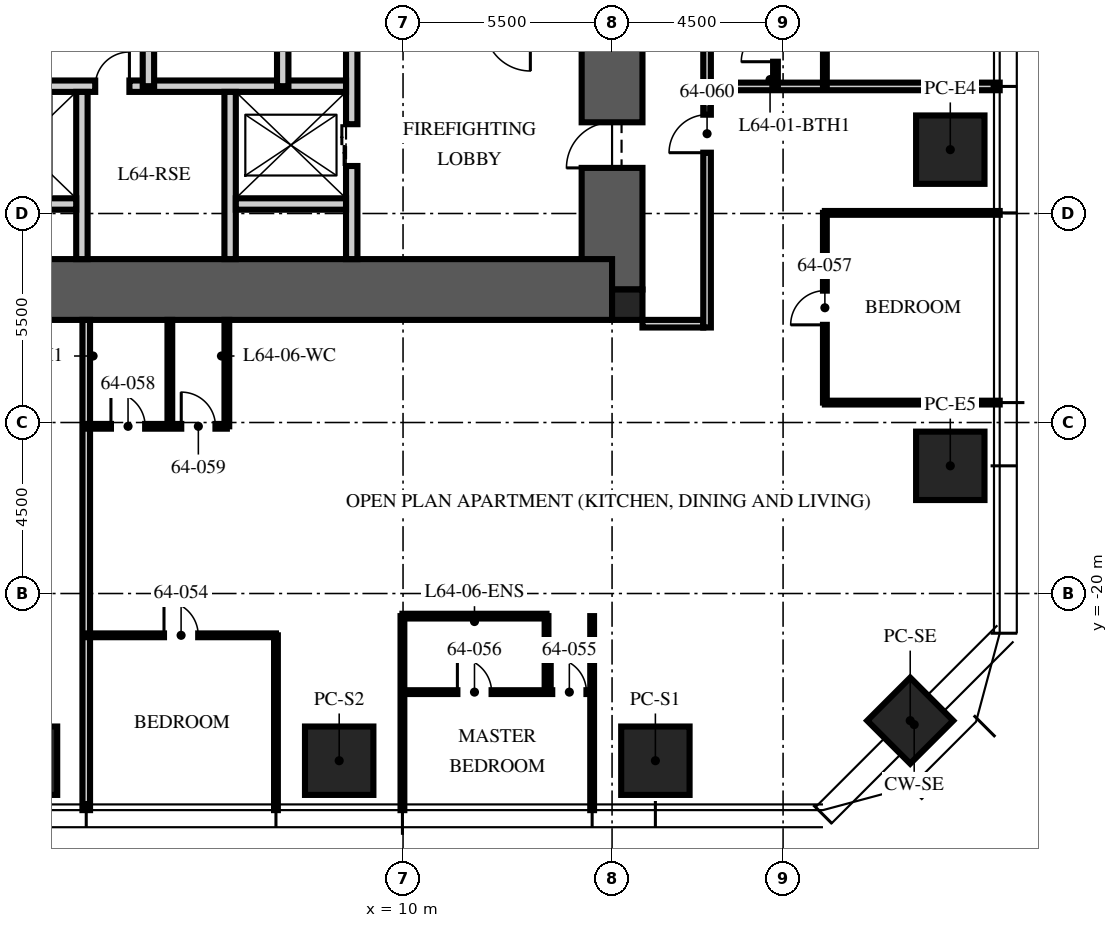
"""IFC4 building model, lengths in metres.
Left out: names, types, materials, properties, quantities, classifications, styles, units other than length and angle.
Written with IfcOpenShell. Run it as: python <this file> out.ifc"""

import sys

from ifc_helpers import new_model, si_unit, direction, frame, frame_2d, origin, origin_2d, place, context, subcontext, project, spatial, rectangle, extrude, element, fill, save


model = new_model("IFC4")
c1 = context("Model", 3, precision=1e-05, world=origin(), true_north=direction((0.0, 1.0)))
c2 = subcontext(c1, "Body", "Model", "MODEL_VIEW")
j1 = project(units=[si_unit("LENGTHUNIT", "METRE"), si_unit("PLANEANGLEUNIT", "RADIAN")], contexts=[c1])
p1 = place(None, origin())
s1 = spatial("IfcSite", under=j1, at=p1, CompositionType="ELEMENT")
p2 = place(p1, origin())
s2 = spatial("IfcBuilding", under=s1, at=p2, CompositionType="ELEMENT")
p3 = place(p2, frame((0.0, 0.0, 255.75)))
s3 = spatial("IfcBuildingStorey", under=s2, at=p3, CompositionType="ELEMENT", Elevation=255.75)
p4 = place(p3, frame((15.5, -12.0, -0.25), z_axis=(0.0, 0.0, 1.0), x_axis=(0.0, 1.0, 0.0)))
e1 = element("IfcWall", 1, at=p4, inside=s3, PredefinedType="SHEAR", context=c2, shape_type="SweptSolid", body=[
    extrude(rectangle(XDim=24.0, YDim=1.6, at=frame_2d((12.0, 0.0))), origin(), (0.0, 0.0, 1.0), 3.75),
])
p5 = place(p4, frame((3.2, 0.0, 0.25)))
e2 = element("IfcOpeningElement", 2, at=p5, cuts=e1, PredefinedType="OPENING", context=c2, shape_type="SweptSolid", body=[
    extrude(rectangle(XDim=1.2, YDim=2.1, at=frame_2d((0.6, 1.05))), frame((0.0, 0.81, 0.0), z_axis=(0.0, -1.0, 0.0), x_axis=(1.0, 0.0, 0.0)), (0.0, 0.0, 1.0), 1.62),
])
p6 = place(p4, frame((19.3, 0.0, 0.25)))
e3 = element("IfcOpeningElement", 3, at=p6, cuts=e1, PredefinedType="OPENING", context=c2, shape_type="SweptSolid", body=[
    extrude(rectangle(XDim=1.8, YDim=2.1, at=frame_2d((0.9, 1.05))), frame((0.0, 0.81, 0.0), z_axis=(0.0, -1.0, 0.0), x_axis=(1.0, 0.0, 0.0)), (0.0, 0.0, 1.0), 1.62),
])
p7 = place(p3, frame((-15.5, -12.0, -0.25), z_axis=(0.0, 0.0, 1.0), x_axis=(1.0, 0.0, 0.0)))
e4 = element("IfcWall", 4, at=p7, inside=s3, PredefinedType="SHEAR", context=c2, shape_type="SweptSolid", body=[
    extrude(rectangle(XDim=31.0, YDim=1.6, at=frame_2d((15.5, 0.0))), origin(), (0.0, 0.0, 1.0), 3.75),
])
p8 = place(p3, frame((15.9, -12.4, -0.25), z_axis=(0.0, 0.0, 1.0), x_axis=(1.0, 0.0, 0.0)))
e5 = element("IfcColumn", 5, at=p8, inside=s3, PredefinedType="COLUMN", context=c2, shape_type="SweptSolid", body=[
    extrude(rectangle(XDim=0.8, YDim=0.8, at=origin_2d()), origin(), (0.0, 0.0, 1.0), 3.75),
])
for number, where, z_axis, x_axis in (
    (6, (24.4, -8.32, 0.0), (0.0, 0.0, 1.0), (0.0, 1.0, 0.0)),
    (7, (24.4, -16.64, 0.0), (0.0, 0.0, 1.0), (0.0, 1.0, 0.0)),
    (8, (16.64, -24.4, 0.0), (0.0, 0.0, 1.0), (1.0, 0.0, 0.0)),
    (9, (8.32, -24.4, 0.0), (0.0, 0.0, 1.0), (1.0, 0.0, 0.0)),
    (10, (0.0, -24.4, 0.0), (0.0, 0.0, 1.0), (1.0, 0.0, 0.0)),
):
    element("IfcColumn", number, at=place(p3, frame(where, z_axis=z_axis, x_axis=x_axis)), inside=s3, PredefinedType="COLUMN", context=c2, shape_type="SweptSolid", body=[
        extrude(rectangle(XDim=1.8, YDim=1.8, at=origin_2d()), origin(), (0.0, 0.0, 1.0), 3.75),
    ])
p9 = place(p3, frame((23.346, -23.346, 0.0), z_axis=(0.0, 0.0, 1.0), x_axis=(0.707106781187, 0.707106781187, 0.0)))
e11 = element("IfcColumn", 11, at=p9, inside=s3, PredefinedType="COLUMN", context=c2, shape_type="SweptSolid", body=[
    extrude(rectangle(XDim=1.6, YDim=1.6, at=origin_2d()), origin(), (0.0, 0.0, 1.0), 3.75),
])
p10 = place(p3, frame((8.65, -11.2, 0.0), z_axis=(0.0, 0.0, 1.0), x_axis=(0.0, 1.0, 0.0)))
e12 = element("IfcWall", 12, at=p10, inside=s3, PredefinedType="PARTITIONING", context=c2, shape_type="SweptSolid", body=[
    extrude(rectangle(XDim=6.3, YDim=0.3, at=frame_2d((3.15, 0.0))), origin(), (0.0, 0.0, 1.0), 3.5),
])
p11 = place(p10, frame((2.45, 0.0, 0.0)))
e13 = element("IfcOpeningElement", 13, at=p11, cuts=e12, PredefinedType="OPENING", context=c2, shape_type="SweptSolid", body=[
    extrude(rectangle(XDim=1.1, YDim=2.1, at=frame_2d((0.55, 1.05))), frame((0.0, 0.16, 0.0), z_axis=(0.0, -1.0, 0.0), x_axis=(1.0, 0.0, 0.0)), (0.0, 0.0, 1.0), 0.32),
])
p12 = place(p3, frame((-8.5, -6.65, 0.0), z_axis=(0.0, 0.0, 1.0), x_axis=(1.0, 0.0, 0.0)))
e14 = element("IfcWall", 14, at=p12, inside=s3, PredefinedType="PARTITIONING", context=c2, shape_type="SweptSolid", body=[
    extrude(rectangle(XDim=17.0, YDim=0.3, at=frame_2d((8.5, 0.0))), origin(), (0.0, 0.0, 1.0), 3.5),
])
p13 = place(p12, frame((7.8, 0.0, 0.0)))
e15 = element("IfcOpeningElement", 15, at=p13, cuts=e14, PredefinedType="OPENING", context=c2, shape_type="SweptSolid", body=[
    extrude(rectangle(XDim=1.3, YDim=2.4, at=frame_2d((0.65, 1.2))), frame((0.0, 0.16, 0.0), z_axis=(0.0, -1.0, 0.0), x_axis=(1.0, 0.0, 0.0)), (0.0, 0.0, 1.0), 0.32),
])
p14 = place(p12, frame((5.65, 0.0, 0.0)))
e16 = element("IfcOpeningElement", 16, at=p14, cuts=e14, PredefinedType="OPENING", context=c2, shape_type="SweptSolid", body=[
    extrude(rectangle(XDim=0.9, YDim=2.1, at=frame_2d((0.45, 1.05))), frame((0.0, 0.16, 0.0), z_axis=(0.0, -1.0, 0.0), x_axis=(1.0, 0.0, 0.0)), (0.0, 0.0, 1.0), 0.32),
])
p15 = place(p12, frame((10.4, 0.0, 0.0)))
e17 = element("IfcOpeningElement", 17, at=p15, cuts=e14, PredefinedType="OPENING", context=c2, shape_type="SweptSolid", body=[
    extrude(rectangle(XDim=0.9, YDim=2.1, at=frame_2d((0.45, 1.05))), frame((0.0, 0.16, 0.0), z_axis=(0.0, -1.0, 0.0), x_axis=(1.0, 0.0, 0.0)), (0.0, 0.0, 1.0), 0.32),
])
for number, where, z_axis, x_axis in (
    (18, (1.55, -11.2, 0.0), (0.0, 0.0, 1.0), (0.0, 1.0, 0.0)),
    (19, (5.45, -11.2, 0.0), (0.0, 0.0, 1.0), (0.0, 1.0, 0.0)),
):
    element("IfcWall", number, at=place(p3, frame(where, z_axis=z_axis, x_axis=x_axis)), inside=s3, PredefinedType="PARTITIONING", context=c2, shape_type="SweptSolid", body=[
        extrude(rectangle(XDim=4.4, YDim=0.3, at=frame_2d((2.2, 0.0))), origin(), (0.0, 0.0, 1.0), 3.5),
    ])
for number, where, z_axis, x_axis in (
    (20, (-1.5, -9.75, 0.0), (0.0, 0.0, 1.0), (1.0, 0.0, 0.0)),
    (21, (5.6, -9.75, 0.0), (0.0, 0.0, 1.0), (1.0, 0.0, 0.0)),
):
    element("IfcWall", number, at=place(p3, frame(where, z_axis=z_axis, x_axis=x_axis)), inside=s3, PredefinedType="PARTITIONING", context=c2, shape_type="SweptSolid", body=[
        extrude(rectangle(XDim=2.9, YDim=0.3, at=frame_2d((1.45, 0.0))), origin(), (0.0, 0.0, 1.0), 3.5),
    ])
p16 = place(p3, frame((3.3, -6.65, 0.0), z_axis=(0.0, 0.0, 1.0), x_axis=(0.0, 1.0, 0.0)))
e22 = element("IfcWall", 22, at=p16, inside=s3, PredefinedType="PARTITIONING", context=c2, shape_type="SweptSolid", body=[
    extrude(rectangle(XDim=8.65, YDim=0.3, at=frame_2d((4.325, 0.0))), origin(), (0.0, 0.0, 1.0), 3.5),
])
p17 = place(p16, frame((3.875, 0.0, 0.0)))
e23 = element("IfcOpeningElement", 23, at=p17, cuts=e22, PredefinedType="OPENING", context=c2, shape_type="SweptSolid", body=[
    extrude(rectangle(XDim=0.9, YDim=2.1, at=frame_2d((0.45, 1.05))), frame((0.0, 0.16, 0.0), z_axis=(0.0, -1.0, 0.0), x_axis=(1.0, 0.0, 0.0)), (0.0, 0.0, 1.0), 0.32),
])
p18 = place(p3, frame((6.834, -6.65, 0.0), z_axis=(0.0, 0.0, 1.0), x_axis=(0.0, 1.0, 0.0)))
e24 = element("IfcWall", 24, at=p18, inside=s3, PredefinedType="PARTITIONING", context=c2, shape_type="SweptSolid", body=[
    extrude(rectangle(XDim=8.65, YDim=0.3, at=frame_2d((4.325, 0.0))), origin(), (0.0, 0.0, 1.0), 3.5),
])
p19 = place(p3, frame((16.3, -12.9, 0.0), z_axis=(0.0, 0.0, 1.0), x_axis=(1.0, 0.0, 0.0)))
e25 = element("IfcWall", 25, at=p19, inside=s3, PredefinedType="PARTITIONING", context=c2, shape_type="SweptSolid", body=[
    extrude(rectangle(XDim=1.6, YDim=0.2, at=frame_2d((0.8, 0.0))), origin(), (0.0, 0.0, 1.0), 2.3),
])
p20 = place(p3, frame((18.1, -6.656, 0.0), z_axis=(0.0, 0.0, 1.0), x_axis=(1.0, 0.0, 0.0)))
e26 = element("IfcWall", 26, at=p20, inside=s3, PredefinedType="PARTITIONING", context=c2, shape_type="SweptSolid", body=[
    extrude(rectangle(XDim=7.6, YDim=0.2, at=frame_2d((3.8, 0.0))), origin(), (0.0, 0.0, 1.0), 2.91),
])
p21 = place(p3, frame((1.664, -12.8, 0.0), z_axis=(0.0, 0.0, 1.0), x_axis=(0.0, -1.0, 0.0)))
e27 = element("IfcWall", 27, at=p21, inside=s3, PredefinedType="PARTITIONING", context=c2, shape_type="SweptSolid", body=[
    extrude(rectangle(XDim=12.9, YDim=0.2, at=frame_2d((6.45, 0.0))), origin(), (0.0, 0.0, 1.0), 2.91),
])
p22 = place(p3, frame((6.656, -21.1, 0.0), z_axis=(0.0, 0.0, 1.0), x_axis=(0.0, -1.0, 0.0)))
e28 = element("IfcWall", 28, at=p22, inside=s3, PredefinedType="PARTITIONING", context=c2, shape_type="SweptSolid", body=[
    extrude(rectangle(XDim=4.6, YDim=0.1, at=frame_2d((2.3, 0.0))), origin(), (0.0, 0.0, 1.0), 2.91),
])
for number, where, z_axis, x_axis in (
    (29, (9.984, -20.595, 0.0), (0.0, 0.0, 1.0), (0.0, -1.0, 0.0)),
    (30, (14.976, -20.595, 0.0), (0.0, 0.0, 1.0), (0.0, -1.0, 0.0)),
):
    element("IfcWall", number, at=place(p3, frame(where, z_axis=z_axis, x_axis=x_axis)), inside=s3, PredefinedType="PARTITIONING", context=c2, shape_type="SweptSolid", body=[
        extrude(rectangle(XDim=5.105, YDim=0.1, at=frame_2d((2.552, 0.0))), origin(), (0.0, 0.0, 1.0), 2.91),
    ])
for number, where, z_axis, x_axis in (
    (31, (21.1, -14.976, 0.0), (0.0, 0.0, 1.0), (1.0, 0.0, 0.0)),
    (32, (21.1, -9.984, 0.0), (0.0, 0.0, 1.0), (1.0, 0.0, 0.0)),
):
    element("IfcWall", number, at=place(p3, frame(where, z_axis=z_axis, x_axis=x_axis)), inside=s3, PredefinedType="PARTITIONING", context=c2, shape_type="SweptSolid", body=[
        extrude(rectangle(XDim=4.6, YDim=0.1, at=frame_2d((2.3, 0.0))), origin(), (0.0, 0.0, 1.0), 2.91),
    ])
p23 = place(p3, frame((21.1, -6.656, 0.0), z_axis=(0.0, 0.0, 1.0), x_axis=(0.0, 1.0, 0.0)))
e33 = element("IfcWall", 33, at=p23, inside=s3, PredefinedType="PARTITIONING", context=c2, shape_type="SweptSolid", body=[
    extrude(rectangle(XDim=4.992, YDim=0.1, at=frame_2d((2.496, 0.0))), origin(), (0.0, 0.0, 1.0), 2.81),
])
p24 = place(p23, frame((2.046, 0.0, 0.0)))
e34 = element("IfcOpeningElement", 34, at=p24, cuts=e33, PredefinedType="OPENING", context=c2, shape_type="SweptSolid", body=[
    extrude(rectangle(XDim=0.9, YDim=2.1, at=frame_2d((0.45, 1.05))), frame((0.0, 0.06, 0.0), z_axis=(0.0, -1.0, 0.0), x_axis=(1.0, 0.0, 0.0)), (0.0, 0.0, 1.0), 0.12),
])
p25 = place(p3, frame((19.8, -6.656, 0.0), z_axis=(0.0, 0.0, 1.0), x_axis=(0.0, 1.0, 0.0)))
e35 = element("IfcWall", 35, at=p25, inside=s3, PredefinedType="PARTITIONING", context=c2, shape_type="SweptSolid", body=[
    extrude(rectangle(XDim=2.2, YDim=0.125, at=frame_2d((1.1, 0.0))), origin(), (0.0, 0.0, 1.0), 3.5),
])
p26 = place(p25, frame((0.65, 0.0, 0.0)))
e36 = element("IfcOpeningElement", 36, at=p26, cuts=e35, PredefinedType="OPENING", context=c2, shape_type="SweptSolid", body=[
    extrude(rectangle(XDim=0.9, YDim=2.1, at=frame_2d((0.45, 1.05))), frame((0.0, 0.073, 0.0), z_axis=(0.0, -1.0, 0.0), x_axis=(1.0, 0.0, 0.0)), (0.0, 0.0, 1.0), 0.145),
])
p27 = place(p3, frame((1.664, -21.1, 0.0), z_axis=(0.0, 0.0, 1.0), x_axis=(1.0, 0.0, 0.0)))
e37 = element("IfcWall", 37, at=p27, inside=s3, PredefinedType="PARTITIONING", context=c2, shape_type="SweptSolid", body=[
    extrude(rectangle(XDim=4.992, YDim=0.1, at=frame_2d((2.496, 0.0))), origin(), (0.0, 0.0, 1.0), 2.81),
])
p28 = place(p27, frame((2.046, 0.0, 0.0)))
e38 = element("IfcOpeningElement", 38, at=p28, cuts=e37, PredefinedType="OPENING", context=c2, shape_type="SweptSolid", body=[
    extrude(rectangle(XDim=0.9, YDim=2.1, at=frame_2d((0.45, 1.05))), frame((0.0, 0.06, 0.0), z_axis=(0.0, -1.0, 0.0), x_axis=(1.0, 0.0, 0.0)), (0.0, 0.0, 1.0), 0.12),
])
p29 = place(p3, frame((9.984, -22.595, 0.0), z_axis=(0.0, 0.0, 1.0), x_axis=(1.0, 0.0, 0.0)))
e39 = element("IfcWall", 39, at=p29, inside=s3, PredefinedType="PARTITIONING", context=c2, shape_type="SweptSolid", body=[
    extrude(rectangle(XDim=4.992, YDim=0.1, at=frame_2d((2.496, 0.0))), origin(), (0.0, 0.0, 1.0), 2.81),
])
p30 = place(p29, frame((3.942, 0.0, 0.0)))
e40 = element("IfcOpeningElement", 40, at=p30, cuts=e39, PredefinedType="OPENING", context=c2, shape_type="SweptSolid", body=[
    extrude(rectangle(XDim=0.9, YDim=2.1, at=frame_2d((0.45, 1.05))), frame((0.0, 0.06, 0.0), z_axis=(0.0, -1.0, 0.0), x_axis=(1.0, 0.0, 0.0)), (0.0, 0.0, 1.0), 0.12),
])
p31 = place(p29, frame((1.446, 0.0, 0.0)))
e41 = element("IfcOpeningElement", 41, at=p31, cuts=e39, PredefinedType="OPENING", context=c2, shape_type="SweptSolid", body=[
    extrude(rectangle(XDim=0.9, YDim=2.1, at=frame_2d((0.45, 1.05))), frame((0.0, 0.06, 0.0), z_axis=(0.0, -1.0, 0.0), x_axis=(1.0, 0.0, 0.0)), (0.0, 0.0, 1.0), 0.12),
])
p32 = place(p3, frame((13.776, -20.595, 0.0), z_axis=(0.0, 0.0, 1.0), x_axis=(0.0, -1.0, 0.0)))
e42 = element("IfcWall", 42, at=p32, inside=s3, PredefinedType="PARTITIONING", context=c2, shape_type="SweptSolid", body=[
    extrude(rectangle(XDim=2.0, YDim=0.1, at=frame_2d((1.0, 0.0))), origin(), (0.0, 0.0, 1.0), 3.5),
])
p33 = place(p3, frame((9.984, -20.595, 0.0), z_axis=(0.0, 0.0, 1.0), x_axis=(1.0, 0.0, 0.0)))
e43 = element("IfcWall", 43, at=p33, inside=s3, PredefinedType="PARTITIONING", context=c2, shape_type="SweptSolid", body=[
    extrude(rectangle(XDim=3.792, YDim=0.125, at=frame_2d((1.896, 0.0))), origin(), (0.0, 0.0, 1.0), 2.81),
])
p34 = place(p3, frame((21.1, -14.976, 0.0), z_axis=(0.0, 0.0, 1.0), x_axis=(0.0, 1.0, 0.0)))
e44 = element("IfcWall", 44, at=p34, inside=s3, PredefinedType="PARTITIONING", context=c2, shape_type="SweptSolid", body=[
    extrude(rectangle(XDim=4.992, YDim=0.1, at=frame_2d((2.496, 0.0))), origin(), (0.0, 0.0, 1.0), 2.81),
])
p35 = place(p34, frame((2.046, 0.0, 0.0)))
e45 = element("IfcOpeningElement", 45, at=p35, cuts=e44, PredefinedType="OPENING", context=c2, shape_type="SweptSolid", body=[
    extrude(rectangle(XDim=0.9, YDim=2.1, at=frame_2d((0.45, 1.05))), frame((0.0, 0.06, 0.0), z_axis=(0.0, -1.0, 0.0), x_axis=(1.0, 0.0, 0.0)), (0.0, 0.0, 1.0), 0.12),
])
p36 = place(p3, frame((1.664, -15.6, 0.0), z_axis=(0.0, 0.0, 1.0), x_axis=(1.0, 0.0, 0.0)))
e46 = element("IfcWall", 46, at=p36, inside=s3, PredefinedType="PARTITIONING", context=c2, shape_type="SweptSolid", body=[
    extrude(rectangle(XDim=3.7, YDim=0.125, at=frame_2d((1.85, 0.0))), origin(), (0.0, 0.0, 1.0), 2.81),
])
p37 = place(p36, frame((0.65, 0.0, 0.0)))
e47 = element("IfcOpeningElement", 47, at=p37, cuts=e46, PredefinedType="OPENING", context=c2, shape_type="SweptSolid", body=[
    extrude(rectangle(XDim=0.9, YDim=2.1, at=frame_2d((0.45, 1.05))), frame((0.0, 0.073, 0.0), z_axis=(0.0, -1.0, 0.0), x_axis=(1.0, 0.0, 0.0)), (0.0, 0.0, 1.0), 0.145),
])
p38 = place(p36, frame((2.5, 0.0, 0.0)))
e48 = element("IfcOpeningElement", 48, at=p38, cuts=e46, PredefinedType="OPENING", context=c2, shape_type="SweptSolid", body=[
    extrude(rectangle(XDim=0.9, YDim=2.1, at=frame_2d((0.45, 1.05))), frame((0.0, 0.073, 0.0), z_axis=(0.0, -1.0, 0.0), x_axis=(1.0, 0.0, 0.0)), (0.0, 0.0, 1.0), 0.145),
])
for number, where, z_axis, x_axis in (
    (49, (3.864, -12.8, 0.0), (0.0, 0.0, 1.0), (0.0, -1.0, 0.0)),
    (50, (5.364, -12.8, 0.0), (0.0, 0.0, 1.0), (0.0, -1.0, 0.0)),
):
    element("IfcWall", number, at=place(p3, frame(where, z_axis=z_axis, x_axis=x_axis)), inside=s3, PredefinedType="PARTITIONING", context=c2, shape_type="SweptSolid", body=[
        extrude(rectangle(XDim=2.8, YDim=0.125, at=frame_2d((1.4, 0.0))), origin(), (0.0, 0.0, 1.0), 3.5),
    ])
p39 = place(p3, frame((18.0, -13.0, 0.0), z_axis=(0.0, 0.0, 1.0), x_axis=(0.0, 1.0, 0.0)))
e51 = element("IfcWall", 51, at=p39, inside=s3, PredefinedType="PARTITIONING", context=c2, shape_type="SweptSolid", body=[
    extrude(rectangle(XDim=25.8, YDim=0.2, at=frame_2d((12.9, 0.0))), origin(), (0.0, 0.0, 1.0), 2.6),
])
p40 = place(p39, frame((21.364, 0.0, 0.0)))
e52 = element("IfcOpeningElement", 52, at=p40, cuts=e51, PredefinedType="OPENING", context=c2, shape_type="SweptSolid", body=[
    extrude(rectangle(XDim=1.0, YDim=2.2, at=frame_2d((0.5, 1.1))), frame((0.0, 0.11, 0.0), z_axis=(0.0, -1.0, 0.0), x_axis=(1.0, 0.0, 0.0)), (0.0, 0.0, 1.0), 0.22),
])
p41 = place(p39, frame((23.754, 0.0, 0.0)))
e53 = element("IfcOpeningElement", 53, at=p41, cuts=e51, PredefinedType="OPENING", context=c2, shape_type="SweptSolid", body=[
    extrude(rectangle(XDim=1.0, YDim=2.2, at=frame_2d((0.5, 1.1))), frame((0.0, 0.11, 0.0), z_axis=(0.0, -1.0, 0.0), x_axis=(1.0, 0.0, 0.0)), (0.0, 0.0, 1.0), 0.22),
])
p42 = place(p39, frame((4.6, 0.0, 0.0)))
e54 = element("IfcOpeningElement", 54, at=p42, cuts=e51, PredefinedType="OPENING", context=c2, shape_type="SweptSolid", body=[
    extrude(rectangle(XDim=1.0, YDim=2.2, at=frame_2d((0.5, 1.1))), frame((0.0, 0.11, 0.0), z_axis=(0.0, -1.0, 0.0), x_axis=(1.0, 0.0, 0.0)), (0.0, 0.0, 1.0), 0.22),
])
p43 = place(p5, origin())
e55 = element("IfcDoor", 55, at=p43, inside=s3, OperationType="SINGLE_SWING_LEFT", PredefinedType="DOOR", context=c2, shape_type="SweptSolid", body=[
    extrude(rectangle(XDim=1.2, YDim=2.1, at=frame_2d((0.6, 1.05))), frame((0.0, 0.025, 0.0), z_axis=(0.0, -1.0, 0.0), x_axis=(1.0, 0.0, 0.0)), (0.0, 0.0, 1.0), 0.05),
])
fill(e2, e55)
p44 = place(p11, origin())
e56 = element("IfcDoor", 56, at=p44, inside=s3, OperationType="DOUBLE_DOOR_SLIDING", PredefinedType="DOOR", context=c2, shape_type="SweptSolid", body=[
    extrude(rectangle(XDim=1.1, YDim=2.1, at=frame_2d((0.55, 1.05))), frame((0.0, 0.025, 0.0), z_axis=(0.0, -1.0, 0.0), x_axis=(1.0, 0.0, 0.0)), (0.0, 0.0, 1.0), 0.05),
])
fill(e13, e56)
p45 = place(p15, origin())
e57 = element("IfcDoor", 57, at=p45, inside=s3, OperationType="SINGLE_SWING_RIGHT", PredefinedType="DOOR", context=c2, shape_type="SweptSolid", body=[
    extrude(rectangle(XDim=0.9, YDim=2.1, at=frame_2d((0.45, 1.05))), frame((0.0, 0.025, 0.0), z_axis=(0.0, -1.0, 0.0), x_axis=(1.0, 0.0, 0.0)), (0.0, 0.0, 1.0), 0.05),
])
fill(e17, e57)
p46 = place(p26, origin())
e58 = element("IfcDoor", 58, at=p46, inside=s3, OperationType="SINGLE_SWING_LEFT", PredefinedType="DOOR", context=c2, shape_type="SweptSolid", body=[
    extrude(rectangle(XDim=0.9, YDim=2.1, at=frame_2d((0.45, 1.05))), frame((0.0, 0.025, 0.0), z_axis=(0.0, -1.0, 0.0), x_axis=(1.0, 0.0, 0.0)), (0.0, 0.0, 1.0), 0.05),
])
fill(e36, e58)
p47 = place(p28, origin())
e59 = element("IfcDoor", 59, at=p47, inside=s3, OperationType="SINGLE_SWING_LEFT", PredefinedType="DOOR", context=c2, shape_type="SweptSolid", body=[
    extrude(rectangle(XDim=0.9, YDim=2.1, at=frame_2d((0.45, 1.05))), frame((0.0, 0.025, 0.0), z_axis=(0.0, -1.0, 0.0), x_axis=(1.0, 0.0, 0.0)), (0.0, 0.0, 1.0), 0.05),
])
fill(e38, e59)
p48 = place(p30, origin())
e60 = element("IfcDoor", 60, at=p48, inside=s3, OperationType="SINGLE_SWING_LEFT", PredefinedType="DOOR", context=c2, shape_type="SweptSolid", body=[
    extrude(rectangle(XDim=0.9, YDim=2.1, at=frame_2d((0.45, 1.05))), frame((0.0, 0.025, 0.0), z_axis=(0.0, -1.0, 0.0), x_axis=(1.0, 0.0, 0.0)), (0.0, 0.0, 1.0), 0.05),
])
fill(e40, e60)
p49 = place(p31, origin())
e61 = element("IfcDoor", 61, at=p49, inside=s3, OperationType="SINGLE_SWING_LEFT", PredefinedType="DOOR", context=c2, shape_type="SweptSolid", body=[
    extrude(rectangle(XDim=0.9, YDim=2.1, at=frame_2d((0.45, 1.05))), frame((0.0, 0.025, 0.0), z_axis=(0.0, -1.0, 0.0), x_axis=(1.0, 0.0, 0.0)), (0.0, 0.0, 1.0), 0.05),
])
fill(e41, e61)
p50 = place(p35, origin())
e62 = element("IfcDoor", 62, at=p50, inside=s3, OperationType="SINGLE_SWING_LEFT", PredefinedType="DOOR", context=c2, shape_type="SweptSolid", body=[
    extrude(rectangle(XDim=0.9, YDim=2.1, at=frame_2d((0.45, 1.05))), frame((0.0, 0.025, 0.0), z_axis=(0.0, -1.0, 0.0), x_axis=(1.0, 0.0, 0.0)), (0.0, 0.0, 1.0), 0.05),
])
fill(e45, e62)
p51 = place(p37, origin())
e63 = element("IfcDoor", 63, at=p51, inside=s3, OperationType="SINGLE_SWING_LEFT", PredefinedType="DOOR", context=c2, shape_type="SweptSolid", body=[
    extrude(rectangle(XDim=0.9, YDim=2.1, at=frame_2d((0.45, 1.05))), frame((0.0, 0.025, 0.0), z_axis=(0.0, -1.0, 0.0), x_axis=(1.0, 0.0, 0.0)), (0.0, 0.0, 1.0), 0.05),
])
fill(e47, e63)
p52 = place(p38, origin())
e64 = element("IfcDoor", 64, at=p52, inside=s3, OperationType="SINGLE_SWING_LEFT", PredefinedType="DOOR", context=c2, shape_type="SweptSolid", body=[
    extrude(rectangle(XDim=0.9, YDim=2.1, at=frame_2d((0.45, 1.05))), frame((0.0, 0.025, 0.0), z_axis=(0.0, -1.0, 0.0), x_axis=(1.0, 0.0, 0.0)), (0.0, 0.0, 1.0), 0.05),
])
fill(e48, e64)
p53 = place(p42, origin())
e65 = element("IfcDoor", 65, at=p53, inside=s3, OperationType="SINGLE_SWING_LEFT", PredefinedType="DOOR", context=c2, shape_type="SweptSolid", body=[
    extrude(rectangle(XDim=1.0, YDim=2.2, at=frame_2d((0.5, 1.1))), frame((0.0, 0.025, 0.0), z_axis=(0.0, -1.0, 0.0), x_axis=(1.0, 0.0, 0.0)), (0.0, 0.0, 1.0), 0.05),
])
fill(e54, e65)
save(model, sys.argv[1])
